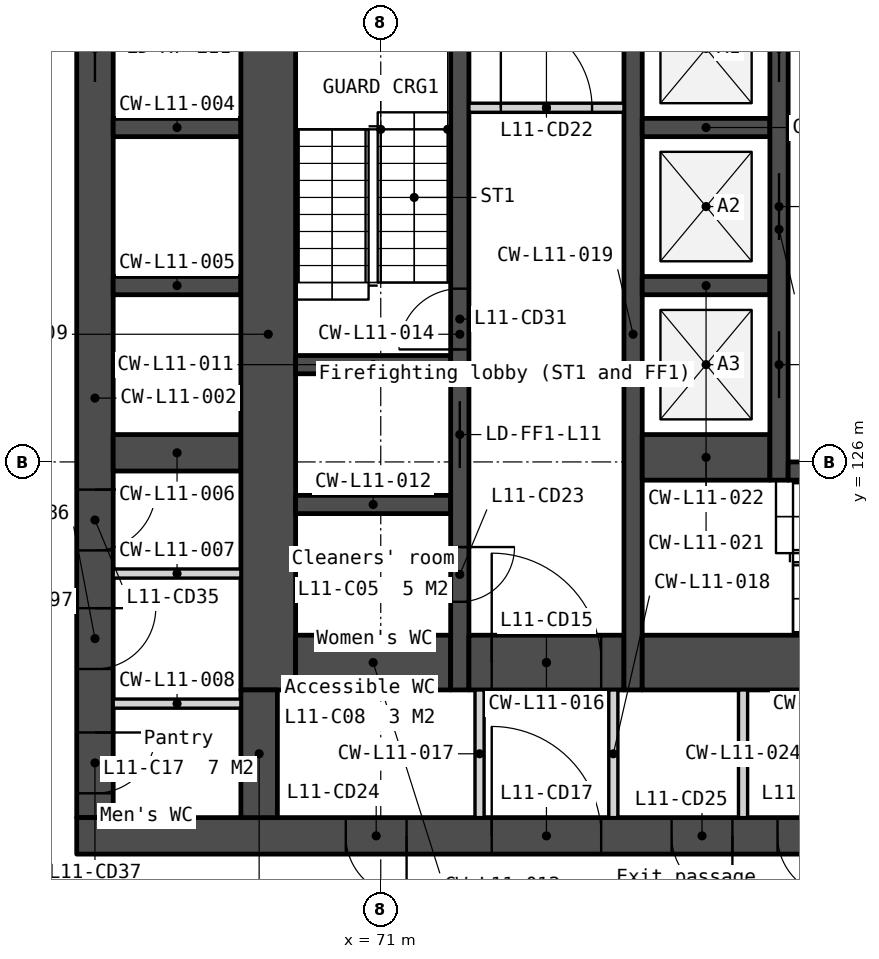
"""IFC4 building model, lengths in metres.
Left out: names, types, materials, properties, quantities, classifications, styles, units other than length and angle.
Written with IfcOpenShell. Run it as: python <this file> out.ifc"""

import sys

from ifc_helpers import new_model, si_unit, direction, frame, frame_2d, origin, place, context, subcontext, project, spatial, rectangle, extrude, element, fill, save


model = new_model("IFC4")
c1 = context("Model", 3, precision=1e-05, world=origin(), true_north=direction((0.0, 1.0)))
c2 = subcontext(c1, "Body", "Model", "MODEL_VIEW")
j1 = project(units=[si_unit("LENGTHUNIT", "METRE"), si_unit("PLANEANGLEUNIT", "RADIAN")], contexts=[c1])
p1 = place(None, origin())
s1 = spatial("IfcSite", under=j1, at=p1, CompositionType="ELEMENT")
p2 = place(p1, origin())
s2 = spatial("IfcBuilding", under=s1, at=p2, CompositionType="ELEMENT")
p3 = place(p2, frame((0.0, 0.0, 52.5)))
s3 = spatial("IfcBuildingStorey", under=s2, at=p3, CompositionType="ELEMENT", Elevation=52.5)
p4 = place(p3, frame((66.3, 133.95, 0.0), z_axis=(0.0, 0.0, 1.0), x_axis=(0.0, -1.0, 0.0)))
e1 = element("IfcWall", 1, at=p4, inside=s3, PredefinedType="SOLIDWALL", context=c2, shape_type="SweptSolid", body=[
    extrude(rectangle(XDim=13.8, YDim=0.6, at=frame_2d((6.9, 0.0))), origin(), (0.0, 0.0, 1.0), 3.35),
])
p5 = place(p4, frame((0.6, 0.0, 0.0)))
e2 = element("IfcOpeningElement", 2, at=p5, cuts=e1, PredefinedType="OPENING", context=c2, shape_type="SweptSolid", body=[
    extrude(rectangle(XDim=1.1, YDim=2.1, at=frame_2d((0.55, 1.05))), frame((0.0, 0.31, 0.0), z_axis=(0.0, -1.0, 0.0), x_axis=(1.0, 0.0, 0.0)), (0.0, 0.0, 1.0), 0.62),
])
p6 = place(p4, frame((8.405, 0.0, 0.0)))
e3 = element("IfcOpeningElement", 3, at=p6, cuts=e1, PredefinedType="OPENING", context=c2, shape_type="SweptSolid", body=[
    extrude(rectangle(XDim=1.0, YDim=2.1, at=frame_2d((0.5, 1.05))), frame((0.0, 0.31, 0.0), z_axis=(0.0, -1.0, 0.0), x_axis=(1.0, 0.0, 0.0)), (0.0, 0.0, 1.0), 0.62),
])
p7 = place(p4, frame((10.355, 0.0, 0.0)))
e4 = element("IfcOpeningElement", 4, at=p7, cuts=e1, PredefinedType="OPENING", context=c2, shape_type="SweptSolid", body=[
    extrude(rectangle(XDim=1.0, YDim=2.1, at=frame_2d((0.5, 1.05))), frame((0.0, 0.31, 0.0), z_axis=(0.0, -1.0, 0.0), x_axis=(1.0, 0.0, 0.0)), (0.0, 0.0, 1.0), 0.62),
])
p8 = place(p4, frame((12.4, 0.0, 0.0)))
e5 = element("IfcOpeningElement", 5, at=p8, cuts=e1, PredefinedType="OPENING", context=c2, shape_type="SweptSolid", body=[
    extrude(rectangle(XDim=1.0, YDim=2.1, at=frame_2d((0.5, 1.05))), frame((0.0, 0.31, 0.0), z_axis=(0.0, -1.0, 0.0), x_axis=(1.0, 0.0, 0.0)), (0.0, 0.0, 1.0), 0.62),
])
p9 = place(p3, frame((66.0, 119.85, 0.0), z_axis=(0.0, 0.0, 1.0), x_axis=(1.0, 0.0, 0.0)))
e6 = element("IfcWall", 6, at=p9, inside=s3, PredefinedType="SOLIDWALL", context=c2, shape_type="SweptSolid", body=[
    extrude(rectangle(XDim=28.0, YDim=0.6, at=frame_2d((14.0, 0.0))), origin(), (0.0, 0.0, 1.0), 3.35),
])
p10 = place(p9, frame((6.825, 0.0, 0.0)))
e7 = element("IfcOpeningElement", 7, at=p10, cuts=e6, PredefinedType="OPENING", context=c2, shape_type="SweptSolid", body=[
    extrude(rectangle(XDim=1.8, YDim=2.1, at=frame_2d((0.9, 1.05))), frame((0.0, 0.31, 0.0), z_axis=(0.0, -1.0, 0.0), x_axis=(1.0, 0.0, 0.0)), (0.0, 0.0, 1.0), 0.62),
])
p11 = place(p9, frame((15.85, 0.0, 0.0)))
e8 = element("IfcOpeningElement", 8, at=p11, cuts=e6, PredefinedType="OPENING", context=c2, shape_type="SweptSolid", body=[
    extrude(rectangle(XDim=1.5, YDim=2.1, at=frame_2d((0.75, 1.05))), frame((0.0, 0.31, 0.0), z_axis=(0.0, -1.0, 0.0), x_axis=(1.0, 0.0, 0.0)), (0.0, 0.0, 1.0), 0.62),
])
p12 = place(p9, frame((19.375, 0.0, 0.0)))
e9 = element("IfcOpeningElement", 9, at=p12, cuts=e6, PredefinedType="OPENING", context=c2, shape_type="SweptSolid", body=[
    extrude(rectangle(XDim=1.8, YDim=2.1, at=frame_2d((0.9, 1.05))), frame((0.0, 0.31, 0.0), z_axis=(0.0, -1.0, 0.0), x_axis=(1.0, 0.0, 0.0)), (0.0, 0.0, 1.0), 0.62),
])
p13 = place(p9, frame((4.425, 0.0, 0.0)))
e10 = element("IfcOpeningElement", 10, at=p13, cuts=e6, PredefinedType="OPENING", context=c2, shape_type="SweptSolid", body=[
    extrude(rectangle(XDim=1.0, YDim=2.1, at=frame_2d((0.5, 1.05))), frame((0.0, 0.31, 0.0), z_axis=(0.0, -1.0, 0.0), x_axis=(1.0, 0.0, 0.0)), (0.0, 0.0, 1.0), 0.62),
])
p14 = place(p9, frame((9.783, 0.0, 0.0)))
e11 = element("IfcOpeningElement", 11, at=p14, cuts=e6, PredefinedType="OPENING", context=c2, shape_type="SweptSolid", body=[
    extrude(rectangle(XDim=1.0, YDim=2.1, at=frame_2d((0.5, 1.05))), frame((0.0, 0.31, 0.0), z_axis=(0.0, -1.0, 0.0), x_axis=(1.0, 0.0, 0.0)), (0.0, 0.0, 1.0), 0.62),
])
p15 = place(p9, frame((11.525, 0.0, 0.0)))
e12 = element("IfcOpeningElement", 12, at=p15, cuts=e6, PredefinedType="OPENING", context=c2, shape_type="SweptSolid", body=[
    extrude(rectangle(XDim=1.0, YDim=2.1, at=frame_2d((0.5, 1.05))), frame((0.0, 0.31, 0.0), z_axis=(0.0, -1.0, 0.0), x_axis=(1.0, 0.0, 0.0)), (0.0, 0.0, 1.0), 0.62),
])
p16 = place(p9, frame((13.658, 0.0, 0.0)))
e13 = element("IfcOpeningElement", 13, at=p16, cuts=e6, PredefinedType="OPENING", context=c2, shape_type="SweptSolid", body=[
    extrude(rectangle(XDim=1.0, YDim=2.1, at=frame_2d((0.5, 1.05))), frame((0.0, 0.31, 0.0), z_axis=(0.0, -1.0, 0.0), x_axis=(1.0, 0.0, 0.0)), (0.0, 0.0, 1.0), 0.62),
])
p17 = place(p9, frame((21.725, 0.0, 0.0)))
e14 = element("IfcOpeningElement", 14, at=p17, cuts=e6, PredefinedType="OPENING", context=c2, shape_type="SweptSolid", body=[
    extrude(rectangle(XDim=1.0, YDim=2.1, at=frame_2d((0.5, 1.05))), frame((0.0, 0.31, 0.0), z_axis=(0.0, -1.0, 0.0), x_axis=(1.0, 0.0, 0.0)), (0.0, 0.0, 1.0), 0.62),
])
p18 = place(p9, frame((23.425, 0.0, 0.0)))
e15 = element("IfcOpeningElement", 15, at=p18, cuts=e6, PredefinedType="OPENING", context=c2, shape_type="SweptSolid", body=[
    extrude(rectangle(XDim=1.0, YDim=2.1, at=frame_2d((0.5, 1.05))), frame((0.0, 0.31, 0.0), z_axis=(0.0, -1.0, 0.0), x_axis=(1.0, 0.0, 0.0)), (0.0, 0.0, 1.0), 0.62),
])
for number, where, z_axis, x_axis in (
    (16, (66.6, 131.5, 0.0), (0.0, 0.0, 1.0), (1.0, 0.0, 0.0)),
    (17, (66.6, 128.9, 0.0), (0.0, 0.0, 1.0), (1.0, 0.0, 0.0)),
):
    element("IfcWall", number, at=place(p3, frame(where, z_axis=z_axis, x_axis=x_axis)), inside=s3, PredefinedType="SOLIDWALL", context=c2, shape_type="SweptSolid", body=[
        extrude(rectangle(XDim=2.1, YDim=0.3, at=frame_2d((1.05, 0.0))), origin(), (0.0, 0.0, 1.0), 3.35),
    ])
p19 = place(p3, frame((66.6, 126.15, 0.0), z_axis=(0.0, 0.0, 1.0), x_axis=(1.0, 0.0, 0.0)))
e18 = element("IfcWall", 18, at=p19, inside=s3, PredefinedType="SOLIDWALL", context=c2, shape_type="SweptSolid", body=[
    extrude(rectangle(XDim=2.1, YDim=0.6, at=frame_2d((1.05, 0.0))), origin(), (0.0, 0.0, 1.0), 3.35),
])
for number, where, z_axis, x_axis in (
    (19, (66.6, 124.165, 0.0), (0.0, 0.0, 1.0), (1.0, 0.0, 0.0)),
    (20, (66.6, 122.025, 0.0), (0.0, 0.0, 1.0), (1.0, 0.0, 0.0)),
):
    element("IfcWall", number, at=place(p3, frame(where, z_axis=z_axis, x_axis=x_axis)), inside=s3, PredefinedType="PARTITIONING", context=c2, shape_type="SweptSolid", body=[
        extrude(rectangle(XDim=2.1, YDim=0.15, at=frame_2d((1.05, 0.0))), origin(), (0.0, 0.0, 1.0), 3.35),
    ])
p20 = place(p3, frame((69.15, 133.95, 0.0), z_axis=(0.0, 0.0, 1.0), x_axis=(0.0, -1.0, 0.0)))
e21 = element("IfcWall", 21, at=p20, inside=s3, PredefinedType="SOLIDWALL", context=c2, shape_type="SweptSolid", body=[
    extrude(rectangle(XDim=11.7, YDim=0.9, at=frame_2d((5.85, 0.0))), origin(), (0.0, 0.0, 1.0), 3.35),
])
p21 = place(p3, frame((69.0, 122.25, 0.0), z_axis=(0.0, 0.0, 1.0), x_axis=(0.0, -1.0, 0.0)))
e22 = element("IfcWall", 22, at=p21, inside=s3, PredefinedType="SOLIDWALL", context=c2, shape_type="SweptSolid", body=[
    extrude(rectangle(XDim=2.1, YDim=0.6, at=frame_2d((1.05, 0.0))), origin(), (0.0, 0.0, 1.0), 3.35),
])
for number, where, z_axis, x_axis in (
    (23, (69.6, 127.6, 0.0), (0.0, 0.0, 1.0), (1.0, 0.0, 0.0)),
    (24, (69.6, 125.3, 0.0), (0.0, 0.0, 1.0), (1.0, 0.0, 0.0)),
):
    element("IfcWall", number, at=place(p3, frame(where, z_axis=z_axis, x_axis=x_axis)), inside=s3, PredefinedType="SOLIDWALL", context=c2, shape_type="SweptSolid", body=[
        extrude(rectangle(XDim=2.55, YDim=0.3, at=frame_2d((1.275, 0.0))), origin(), (0.0, 0.0, 1.0), 3.35),
    ])
p22 = place(p3, frame((69.6, 122.7, 0.0), z_axis=(0.0, 0.0, 1.0), x_axis=(1.0, 0.0, 0.0)))
e25 = element("IfcWall", 25, at=p22, inside=s3, PredefinedType="SOLIDWALL", context=c2, shape_type="SweptSolid", body=[
    extrude(rectangle(XDim=2.55, YDim=0.9, at=frame_2d((1.275, 0.0))), origin(), (0.0, 0.0, 1.0), 3.35),
])
p23 = place(p3, frame((72.3, 133.95, 0.0), z_axis=(0.0, 0.0, 1.0), x_axis=(0.0, -1.0, 0.0)))
e26 = element("IfcWall", 26, at=p23, inside=s3, PredefinedType="SOLIDWALL", context=c2, shape_type="SweptSolid", body=[
    extrude(rectangle(XDim=11.7, YDim=0.3, at=frame_2d((5.85, 0.0))), origin(), (0.0, 0.0, 1.0), 3.35),
])
p24 = place(p23, frame((6.95, 0.0, 0.0)))
e27 = element("IfcOpeningElement", 27, at=p24, cuts=e26, PredefinedType="OPENING", context=c2, shape_type="SweptSolid", body=[
    extrude(rectangle(XDim=1.1, YDim=2.1, at=frame_2d((0.55, 1.05))), frame((0.0, 0.16, 0.0), z_axis=(0.0, -1.0, 0.0), x_axis=(1.0, 0.0, 0.0)), (0.0, 0.0, 1.0), 0.32),
])
p25 = place(p23, frame((9.35, 0.0, 0.0)))
e28 = element("IfcOpeningElement", 28, at=p25, cuts=e26, PredefinedType="OPENING", context=c2, shape_type="SweptSolid", body=[
    extrude(rectangle(XDim=0.9, YDim=2.1, at=frame_2d((0.45, 1.05))), frame((0.0, 0.16, 0.0), z_axis=(0.0, -1.0, 0.0), x_axis=(1.0, 0.0, 0.0)), (0.0, 0.0, 1.0), 0.32),
])
p26 = place(p23, frame((5.1, 0.0, 0.0)))
e29 = element("IfcOpeningElement", 29, at=p26, cuts=e26, PredefinedType="OPENING", context=c2, shape_type="SweptSolid", body=[
    extrude(rectangle(XDim=1.0, YDim=2.1, at=frame_2d((0.5, 1.05))), frame((0.0, 0.16, 0.0), z_axis=(0.0, -1.0, 0.0), x_axis=(1.0, 0.0, 0.0)), (0.0, 0.0, 1.0), 0.32),
])
p27 = place(p3, frame((72.45, 131.825, 0.0), z_axis=(0.0, 0.0, 1.0), x_axis=(1.0, 0.0, 0.0)))
e30 = element("IfcWall", 30, at=p27, inside=s3, PredefinedType="PARTITIONING", context=c2, shape_type="SweptSolid", body=[
    extrude(rectangle(XDim=2.55, YDim=0.15, at=frame_2d((1.275, 0.0))), origin(), (0.0, 0.0, 1.0), 3.35),
])
p28 = place(p27, frame((0.525, 0.0, 0.0)))
e31 = element("IfcOpeningElement", 31, at=p28, cuts=e30, PredefinedType="OPENING", context=c2, shape_type="SweptSolid", body=[
    extrude(rectangle(XDim=1.5, YDim=2.1, at=frame_2d((0.75, 1.05))), frame((0.0, 0.085, 0.0), z_axis=(0.0, -1.0, 0.0), x_axis=(1.0, 0.0, 0.0)), (0.0, 0.0, 1.0), 0.17),
])
p29 = place(p3, frame((72.45, 122.7, 0.0), z_axis=(0.0, 0.0, 1.0), x_axis=(1.0, 0.0, 0.0)))
e32 = element("IfcWall", 32, at=p29, inside=s3, PredefinedType="SOLIDWALL", context=c2, shape_type="SweptSolid", body=[
    extrude(rectangle(XDim=2.55, YDim=0.9, at=frame_2d((1.275, 0.0))), origin(), (0.0, 0.0, 1.0), 3.35),
])
p30 = place(p29, frame((0.375, 0.0, 0.0)))
e33 = element("IfcOpeningElement", 33, at=p30, cuts=e32, PredefinedType="OPENING", context=c2, shape_type="SweptSolid", body=[
    extrude(rectangle(XDim=1.8, YDim=2.1, at=frame_2d((0.9, 1.05))), frame((0.0, 0.46, 0.0), z_axis=(0.0, -1.0, 0.0), x_axis=(1.0, 0.0, 0.0)), (0.0, 0.0, 1.0), 0.92),
])
for number, where, z_axis, x_axis in (
    (34, (72.625, 122.25, 0.0), (0.0, 0.0, 1.0), (0.0, -1.0, 0.0)),
    (35, (74.825, 122.25, 0.0), (0.0, 0.0, 1.0), (0.0, -1.0, 0.0)),
):
    element("IfcWall", number, at=place(p3, frame(where, z_axis=z_axis, x_axis=x_axis)), inside=s3, PredefinedType="PARTITIONING", context=c2, shape_type="SweptSolid", body=[
        extrude(rectangle(XDim=2.1, YDim=0.15, at=frame_2d((1.05, 0.0))), origin(), (0.0, 0.0, 1.0), 3.35),
    ])
p31 = place(p3, frame((75.15, 133.95, 0.0), z_axis=(0.0, 0.0, 1.0), x_axis=(0.0, -1.0, 0.0)))
e36 = element("IfcWall", 36, at=p31, inside=s3, PredefinedType="SOLIDWALL", context=c2, shape_type="SweptSolid", body=[
    extrude(rectangle(XDim=11.7, YDim=0.3, at=frame_2d((5.85, 0.0))), origin(), (0.0, 0.0, 1.0), 3.35),
])
for number, where, z_axis, x_axis in (
    (37, (75.3, 131.5, 0.0), (0.0, 0.0, 1.0), (1.0, 0.0, 0.0)),
    (38, (75.3, 128.9, 0.0), (0.0, 0.0, 1.0), (1.0, 0.0, 0.0)),
):
    element("IfcWall", number, at=place(p3, frame(where, z_axis=z_axis, x_axis=x_axis)), inside=s3, PredefinedType="SOLIDWALL", context=c2, shape_type="SweptSolid", body=[
        extrude(rectangle(XDim=2.1, YDim=0.3, at=frame_2d((1.05, 0.0))), origin(), (0.0, 0.0, 1.0), 3.35),
    ])
p32 = place(p3, frame((75.3, 126.075, 0.0), z_axis=(0.0, 0.0, 1.0), x_axis=(1.0, 0.0, 0.0)))
e39 = element("IfcWall", 39, at=p32, inside=s3, PredefinedType="SOLIDWALL", context=c2, shape_type="SweptSolid", body=[
    extrude(rectangle(XDim=2.1, YDim=0.75, at=frame_2d((1.05, 0.0))), origin(), (0.0, 0.0, 1.0), 3.35),
])
p33 = place(p3, frame((75.3, 122.7, 0.0), z_axis=(0.0, 0.0, 1.0), x_axis=(1.0, 0.0, 0.0)))
e40 = element("IfcWall", 40, at=p33, inside=s3, PredefinedType="SOLIDWALL", context=c2, shape_type="SweptSolid", body=[
    extrude(rectangle(XDim=6.2, YDim=0.9, at=frame_2d((3.1, 0.0))), origin(), (0.0, 0.0, 1.0), 3.35),
])
p34 = place(p3, frame((76.958, 122.25, 0.0), z_axis=(0.0, 0.0, 1.0), x_axis=(0.0, -1.0, 0.0)))
e41 = element("IfcWall", 41, at=p34, inside=s3, PredefinedType="PARTITIONING", context=c2, shape_type="SweptSolid", body=[
    extrude(rectangle(XDim=2.1, YDim=0.15, at=frame_2d((1.05, 0.0))), origin(), (0.0, 0.0, 1.0), 3.35),
])
p35 = place(p3, frame((77.55, 133.95, 0.0), z_axis=(0.0, 0.0, 1.0), x_axis=(0.0, -1.0, 0.0)))
e42 = element("IfcWall", 42, at=p35, inside=s3, PredefinedType="SOLIDWALL", context=c2, shape_type="SweptSolid", body=[
    extrude(rectangle(XDim=8.25, YDim=0.3, at=frame_2d((4.125, 0.0))), origin(), (0.0, 0.0, 1.0), 3.35),
])
p36 = place(p35, frame((0.6, 0.0, 0.0)))
e43 = element("IfcOpeningElement", 43, at=p36, cuts=e42, PredefinedType="OPENING", context=c2, shape_type="SweptSolid", body=[
    extrude(rectangle(XDim=1.1, YDim=2.1, at=frame_2d((0.55, 1.05))), frame((0.0, 0.16, 0.0), z_axis=(0.0, -1.0, 0.0), x_axis=(1.0, 0.0, 0.0)), (0.0, 0.0, 1.0), 0.32),
])
p37 = place(p35, frame((3.2, 0.0, 0.0)))
e44 = element("IfcOpeningElement", 44, at=p37, cuts=e42, PredefinedType="OPENING", context=c2, shape_type="SweptSolid", body=[
    extrude(rectangle(XDim=1.1, YDim=2.1, at=frame_2d((0.55, 1.05))), frame((0.0, 0.16, 0.0), z_axis=(0.0, -1.0, 0.0), x_axis=(1.0, 0.0, 0.0)), (0.0, 0.0, 1.0), 0.32),
])
p38 = place(p35, frame((5.8, 0.0, 0.0)))
e45 = element("IfcOpeningElement", 45, at=p38, cuts=e42, PredefinedType="OPENING", context=c2, shape_type="SweptSolid", body=[
    extrude(rectangle(XDim=1.1, YDim=2.1, at=frame_2d((0.55, 1.05))), frame((0.0, 0.16, 0.0), z_axis=(0.0, -1.0, 0.0), x_axis=(1.0, 0.0, 0.0)), (0.0, 0.0, 1.0), 0.32),
])
p39 = place(p3, frame((77.7, 125.85, 0.0), z_axis=(0.0, 0.0, 1.0), x_axis=(1.0, 0.0, 0.0)))
e46 = element("IfcWall", 46, at=p39, inside=s3, PredefinedType="SOLIDWALL", context=c2, shape_type="SweptSolid", body=[
    extrude(rectangle(XDim=4.6, YDim=0.3, at=frame_2d((2.3, 0.0))), origin(), (0.0, 0.0, 1.0), 3.35),
])
p40 = place(p36, origin())
e47 = element("IfcDoor", 47, at=p40, inside=s3, OperationType="SLIDING_TO_RIGHT", PredefinedType="DOOR", context=c2, shape_type="SweptSolid", body=[
    extrude(rectangle(XDim=1.1, YDim=2.1, at=frame_2d((0.55, 1.05))), frame((0.0, 0.025, 0.0), z_axis=(0.0, -1.0, 0.0), x_axis=(1.0, 0.0, 0.0)), (0.0, 0.0, 1.0), 0.05),
])
fill(e43, e47)
p41 = place(p37, origin())
e48 = element("IfcDoor", 48, at=p41, inside=s3, OperationType="SLIDING_TO_RIGHT", PredefinedType="DOOR", context=c2, shape_type="SweptSolid", body=[
    extrude(rectangle(XDim=1.1, YDim=2.1, at=frame_2d((0.55, 1.05))), frame((0.0, 0.025, 0.0), z_axis=(0.0, -1.0, 0.0), x_axis=(1.0, 0.0, 0.0)), (0.0, 0.0, 1.0), 0.05),
])
fill(e44, e48)
p42 = place(p38, origin())
e49 = element("IfcDoor", 49, at=p42, inside=s3, OperationType="SLIDING_TO_RIGHT", PredefinedType="DOOR", context=c2, shape_type="SweptSolid", body=[
    extrude(rectangle(XDim=1.1, YDim=2.1, at=frame_2d((0.55, 1.05))), frame((0.0, 0.025, 0.0), z_axis=(0.0, -1.0, 0.0), x_axis=(1.0, 0.0, 0.0)), (0.0, 0.0, 1.0), 0.05),
])
fill(e45, e49)
p43 = place(p5, origin())
e50 = element("IfcDoor", 50, at=p43, inside=s3, OperationType="SLIDING_TO_LEFT", PredefinedType="DOOR", context=c2, shape_type="SweptSolid", body=[
    extrude(rectangle(XDim=1.1, YDim=2.1, at=frame_2d((0.55, 1.05))), frame((0.0, 0.025, 0.0), z_axis=(0.0, -1.0, 0.0), x_axis=(1.0, 0.0, 0.0)), (0.0, 0.0, 1.0), 0.05),
])
fill(e2, e50)
p44 = place(p24, origin())
e51 = element("IfcDoor", 51, at=p44, inside=s3, OperationType="SLIDING_TO_LEFT", PredefinedType="DOOR", context=c2, shape_type="SweptSolid", body=[
    extrude(rectangle(XDim=1.1, YDim=2.1, at=frame_2d((0.55, 1.05))), frame((0.0, 0.025, 0.0), z_axis=(0.0, -1.0, 0.0), x_axis=(1.0, 0.0, 0.0)), (0.0, 0.0, 1.0), 0.05),
])
fill(e27, e51)
p45 = place(p30, origin())
e52 = element("IfcDoor", 52, at=p45, inside=s3, OperationType="DOUBLE_DOOR_DOUBLE_SWING", PredefinedType="DOOR", context=c2, shape_type="SweptSolid", body=[
    extrude(rectangle(XDim=1.8, YDim=2.1, at=frame_2d((0.9, 1.05))), frame((0.0, 0.025, 0.0), z_axis=(0.0, -1.0, 0.0), x_axis=(1.0, 0.0, 0.0)), (0.0, 0.0, 1.0), 0.05),
])
fill(e33, e52)
p46 = place(p10, origin())
e53 = element("IfcDoor", 53, at=p46, inside=s3, OperationType="DOUBLE_DOOR_DOUBLE_SWING", PredefinedType="DOOR", context=c2, shape_type="SweptSolid", body=[
    extrude(rectangle(XDim=1.8, YDim=2.1, at=frame_2d((0.9, 1.05))), frame((0.0, 0.025, 0.0), z_axis=(0.0, -1.0, 0.0), x_axis=(1.0, 0.0, 0.0)), (0.0, 0.0, 1.0), 0.05),
])
fill(e7, e53)
p47 = place(p28, origin())
e54 = element("IfcDoor", 54, at=p47, inside=s3, OperationType="DOUBLE_DOOR_DOUBLE_SWING", PredefinedType="DOOR", context=c2, shape_type="SweptSolid", body=[
    extrude(rectangle(XDim=1.5, YDim=2.1, at=frame_2d((0.75, 1.05))), frame((0.0, 0.025, 0.0), z_axis=(0.0, -1.0, 0.0), x_axis=(1.0, 0.0, 0.0)), (0.0, 0.0, 1.0), 0.05),
])
fill(e31, e54)
p48 = place(p25, origin())
e55 = element("IfcDoor", 55, at=p48, inside=s3, OperationType="SINGLE_SWING_LEFT", PredefinedType="DOOR", context=c2, shape_type="SweptSolid", body=[
    extrude(rectangle(XDim=0.9, YDim=2.1, at=frame_2d((0.45, 1.05))), frame((0.0, 0.025, 0.0), z_axis=(0.0, -1.0, 0.0), x_axis=(1.0, 0.0, 0.0)), (0.0, 0.0, 1.0), 0.05),
])
fill(e28, e55)
p49 = place(p13, origin())
e56 = element("IfcDoor", 56, at=p49, inside=s3, OperationType="SINGLE_SWING_RIGHT", PredefinedType="DOOR", context=c2, shape_type="SweptSolid", body=[
    extrude(rectangle(XDim=1.0, YDim=2.1, at=frame_2d((0.5, 1.05))), frame((0.0, 0.025, 0.0), z_axis=(0.0, -1.0, 0.0), x_axis=(1.0, 0.0, 0.0)), (0.0, 0.0, 1.0), 0.05),
])
fill(e10, e56)
p50 = place(p14, origin())
e57 = element("IfcDoor", 57, at=p50, inside=s3, OperationType="SINGLE_SWING_RIGHT", PredefinedType="DOOR", context=c2, shape_type="SweptSolid", body=[
    extrude(rectangle(XDim=1.0, YDim=2.1, at=frame_2d((0.5, 1.05))), frame((0.0, 0.025, 0.0), z_axis=(0.0, -1.0, 0.0), x_axis=(1.0, 0.0, 0.0)), (0.0, 0.0, 1.0), 0.05),
])
fill(e11, e57)
p51 = place(p15, origin())
e58 = element("IfcDoor", 58, at=p51, inside=s3, OperationType="SINGLE_SWING_RIGHT", PredefinedType="DOOR", context=c2, shape_type="SweptSolid", body=[
    extrude(rectangle(XDim=1.0, YDim=2.1, at=frame_2d((0.5, 1.05))), frame((0.0, 0.025, 0.0), z_axis=(0.0, -1.0, 0.0), x_axis=(1.0, 0.0, 0.0)), (0.0, 0.0, 1.0), 0.05),
])
fill(e12, e58)
p52 = place(p26, origin())
e59 = element("IfcDoor", 59, at=p52, inside=s3, OperationType="SINGLE_SWING_RIGHT", PredefinedType="DOOR", context=c2, shape_type="SweptSolid", body=[
    extrude(rectangle(XDim=1.0, YDim=2.1, at=frame_2d((0.5, 1.05))), frame((0.0, 0.025, 0.0), z_axis=(0.0, -1.0, 0.0), x_axis=(1.0, 0.0, 0.0)), (0.0, 0.0, 1.0), 0.05),
])
fill(e29, e59)
p53 = place(p6, origin())
e60 = element("IfcDoor", 60, at=p53, inside=s3, OperationType="SINGLE_SWING_LEFT", PredefinedType="DOOR", context=c2, shape_type="SweptSolid", body=[
    extrude(rectangle(XDim=1.0, YDim=2.1, at=frame_2d((0.5, 1.05))), frame((0.0, 0.025, 0.0), z_axis=(0.0, -1.0, 0.0), x_axis=(1.0, 0.0, 0.0)), (0.0, 0.0, 1.0), 0.05),
])
fill(e3, e60)
p54 = place(p7, origin())
e61 = element("IfcDoor", 61, at=p54, inside=s3, OperationType="SINGLE_SWING_LEFT", PredefinedType="DOOR", context=c2, shape_type="SweptSolid", body=[
    extrude(rectangle(XDim=1.0, YDim=2.1, at=frame_2d((0.5, 1.05))), frame((0.0, 0.025, 0.0), z_axis=(0.0, -1.0, 0.0), x_axis=(1.0, 0.0, 0.0)), (0.0, 0.0, 1.0), 0.05),
])
fill(e4, e61)
p55 = place(p8, origin())
e62 = element("IfcDoor", 62, at=p55, inside=s3, OperationType="SINGLE_SWING_LEFT", PredefinedType="DOOR", context=c2, shape_type="SweptSolid", body=[
    extrude(rectangle(XDim=1.0, YDim=2.1, at=frame_2d((0.5, 1.05))), frame((0.0, 0.025, 0.0), z_axis=(0.0, -1.0, 0.0), x_axis=(1.0, 0.0, 0.0)), (0.0, 0.0, 1.0), 0.05),
])
fill(e5, e62)
save(model, sys.argv[1])
